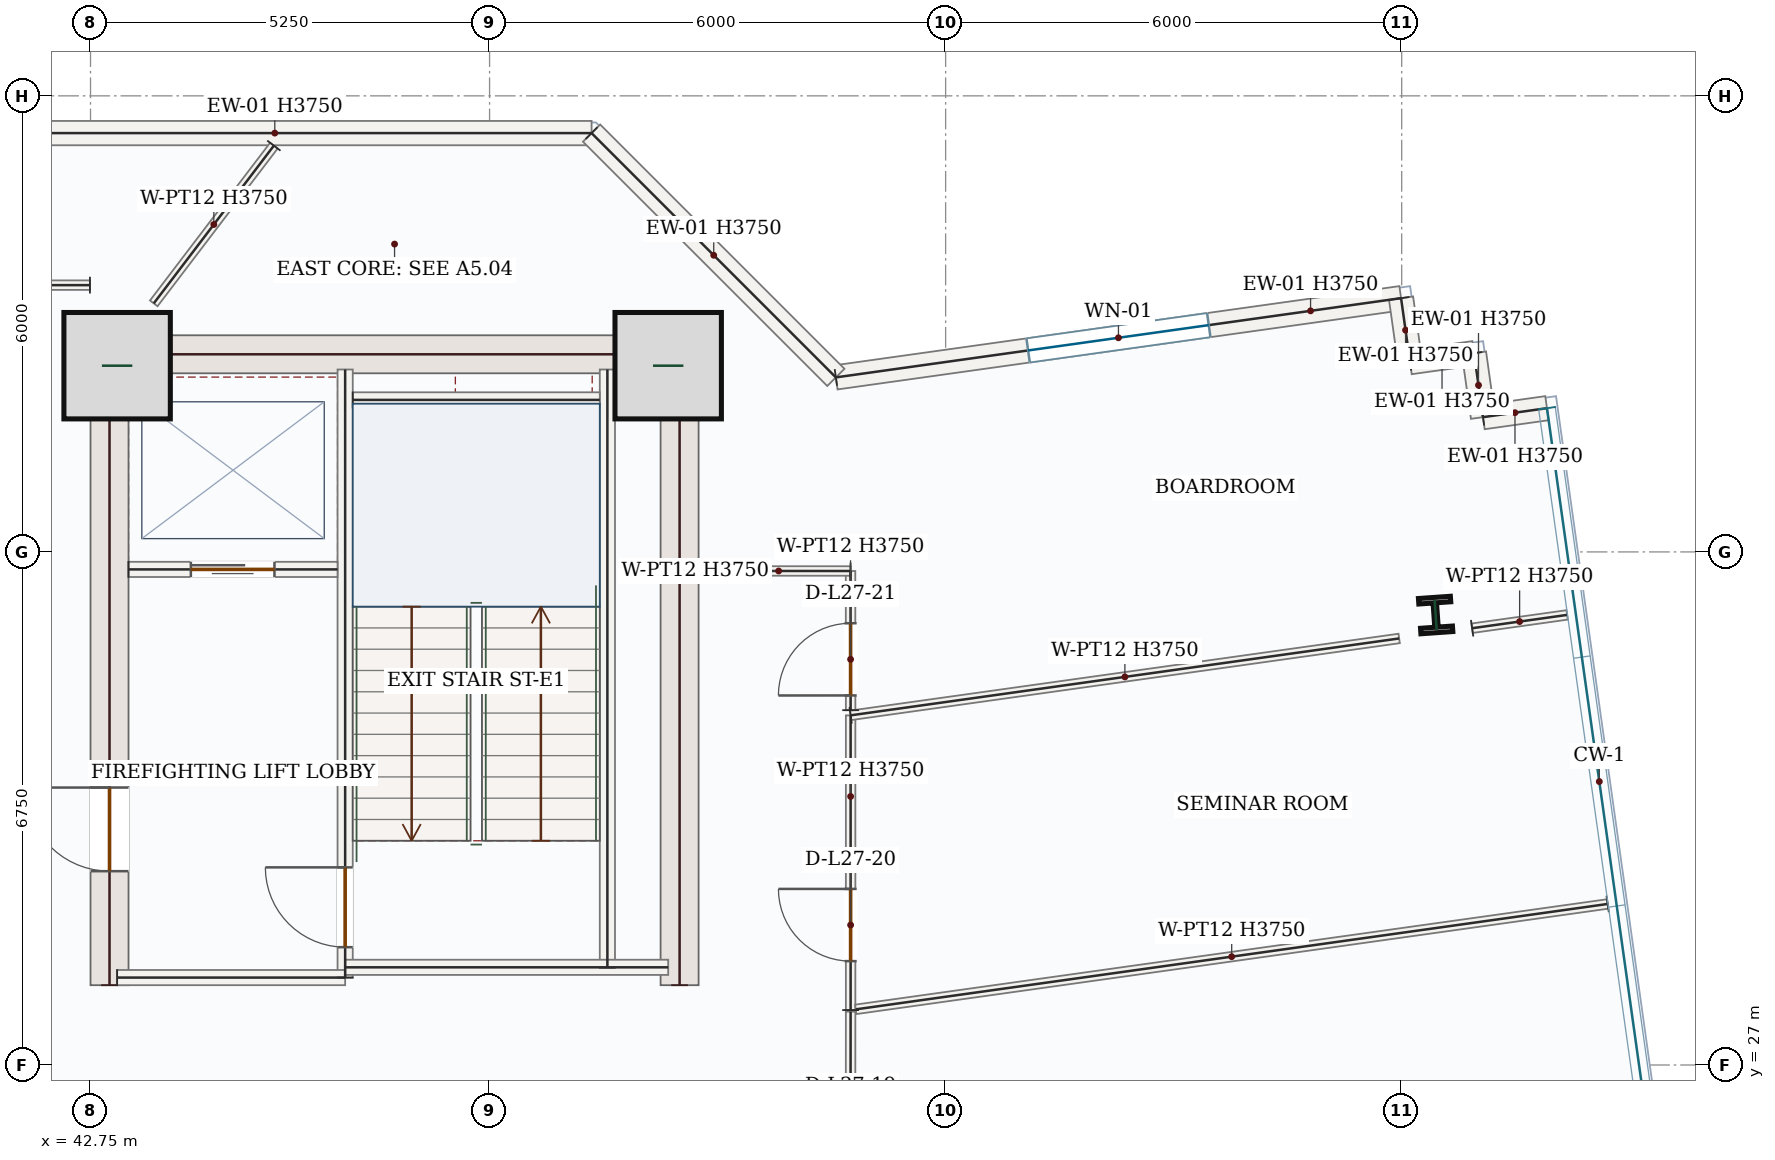
"""IFC4 building model, lengths in metres.
Left out: names, types, materials, properties, quantities, classifications, styles, units other than length and angle.
Written with IfcOpenShell. Run it as: python <this file> out.ifc"""

import sys

from ifc_helpers import new_model, si_unit, direction, frame, frame_2d, origin, origin_2d, place, context, subcontext, project, spatial, rectangle, i_section, extrude, source, transform, mapped, element, fill, save


model = new_model("IFC4")
c1 = context("Model", 3, precision=1e-05, world=origin(), true_north=direction((0.0, 1.0)))
c2 = subcontext(c1, "Body", "Model", "MODEL_VIEW")
j1 = project(units=[si_unit("LENGTHUNIT", "METRE"), si_unit("PLANEANGLEUNIT", "RADIAN")], contexts=[c1])
p1 = place(None, origin())
s1 = spatial("IfcSite", under=j1, at=p1, CompositionType="ELEMENT")
p2 = place(p1, origin())
s2 = spatial("IfcBuilding", under=s1, at=p2, CompositionType="ELEMENT")
p3 = place(p2, frame((0.0, 0.0, 121.5)))
s3 = spatial("IfcBuildingStorey", under=s2, at=p3, CompositionType="ELEMENT", Elevation=121.5)
p4 = place(p3, frame((43.0, 28.05, 0.0), z_axis=(0.0, 0.0, 1.0), x_axis=(0.0, 1.0, 0.0)))
e1 = element("IfcWall", 1, at=p4, inside=s3, PredefinedType="SHEAR", context=c2, shape_type="SweptSolid", body=[
    extrude(rectangle(XDim=8.55, YDim=0.5, at=frame_2d((4.275, 0.0))), origin(), (0.0, 0.0, 1.0), 3.75),
])
p5 = place(p4, frame((1.5, 0.0, 0.0)))
e2 = element("IfcOpeningElement", 2, at=p5, cuts=e1, PredefinedType="OPENING", context=c2, shape_type="SweptSolid", body=[
    extrude(rectangle(XDim=1.1, YDim=2.2, at=frame_2d((0.55, 1.1))), frame((0.0, 0.26, 0.0), z_axis=(0.0, -1.0, 0.0), x_axis=(1.0, 0.0, 0.0)), (0.0, 0.0, 1.0), 0.52),
])
m1 = source(origin(), c2, "Body", "SweptSolid", [
    extrude(rectangle(XDim=8.55, YDim=0.5, at=frame_2d((4.275, 0.0))), origin(), (0.0, 0.0, 1.0), 3.75),
])
p6 = place(p3, frame((50.5, 28.05, 0.0), z_axis=(0.0, 0.0, 1.0), x_axis=(0.0, 1.0, 0.0)))
e3 = element("IfcWall", 3, at=p6, inside=s3, PredefinedType="SHEAR", context=c2, shape_type="MappedRepresentation", body=[
    mapped(m1, transform((0.0, 0.0, 0.0), x_axis=(1.0, 0.0, 0.0), y_axis=(0.0, 1.0, 0.0), z_axis=(0.0, 0.0, 1.0), scale=1.0)),
])
m2 = source(origin(), c2, "Body", "SweptSolid", [
    extrude(rectangle(XDim=7.0, YDim=0.5, at=frame_2d((3.5, 0.0))), origin(), (0.0, 0.0, 1.0), 3.75),
])
p7 = place(p3, frame((43.25, 36.35, 0.0), z_axis=(0.0, 0.0, 1.0), x_axis=(1.0, 0.0, 0.0)))
e4 = element("IfcWall", 4, at=p7, inside=s3, PredefinedType="SHEAR", context=c2, shape_type="MappedRepresentation", body=[
    mapped(m2, transform((0.0, 0.0, 0.0), x_axis=(1.0, 0.0, 0.0), y_axis=(0.0, 1.0, 0.0), z_axis=(0.0, 0.0, 1.0), scale=1.0)),
])
m3 = source(origin(), c2, "Body", "SweptSolid", [
    extrude(rectangle(XDim=1.4, YDim=1.4, at=origin_2d()), origin(), (0.0, 0.0, 1.0), 4.2),
])
for number, where, z_axis, x_axis in (
    (5, (43.1, 36.2, 0.0), (0.0, 0.0, 1.0), (1.0, 0.0, 0.0)),
    (6, (50.35, 36.2, 0.0), (0.0, 0.0, 1.0), (1.0, 0.0, 0.0)),
):
    element("IfcColumn", number, at=place(p3, frame(where, z_axis=z_axis, x_axis=x_axis)), inside=s3, PredefinedType="COLUMN", context=c2, shape_type="MappedRepresentation", body=[
        mapped(m3, transform((0.0, 0.0, 0.0), x_axis=(1.0, 0.0, 0.0), y_axis=(0.0, 1.0, 0.0), z_axis=(0.0, 0.0, 1.0), scale=1.0)),
    ])
m4 = source(origin(), c2, "Body", "SweptSolid", [
    extrude(i_section(OverallWidth=0.421, OverallDepth=0.465, WebThickness=0.045, FlangeThickness=0.073, FilletRadius=0.018, at=origin_2d()), origin(), (0.0, 0.0, 1.0), 4.2),
])
p8 = place(p3, frame((60.447, 32.92, 0.0), z_axis=(0.0, 0.0, 1.0), x_axis=(0.99756405026, 0.069756473744, 0.0)))
e7 = element("IfcColumn", 7, at=p8, inside=s3, PredefinedType="COLUMN", context=c2, shape_type="MappedRepresentation", body=[
    mapped(m4, transform((0.0, 0.0, 0.0), x_axis=(1.0, 0.0, 0.0), y_axis=(0.0, 1.0, 0.0), z_axis=(0.0, 0.0, 1.0), scale=1.0)),
])
p9 = place(p3, frame((52.556, 36.046, 0.0), z_axis=(0.0, 0.0, 1.0), x_axis=(0.990319321248, 0.138807931917, 0.0)))
e8 = element("IfcWall", 8, at=p9, inside=s3, PredefinedType="SOLIDWALL", context=c2, shape_type="SweptSolid", body=[
    extrude(rectangle(XDim=7.509, YDim=0.32, at=frame_2d((3.754, 0.0))), origin(), (0.0, 0.0, 1.0), 3.75),
])
p10 = place(p9, frame((2.554, 0.0, 0.85)))
e9 = element("IfcOpeningElement", 9, at=p10, cuts=e8, PredefinedType="OPENING", context=c2, shape_type="SweptSolid", body=[
    extrude(rectangle(XDim=2.4, YDim=1.8, at=frame_2d((1.2, 0.9))), frame((0.0, 0.17, 0.0), z_axis=(0.0, -1.0, 0.0), x_axis=(1.0, 0.0, 0.0)), (0.0, 0.0, 1.0), 0.34),
])
m5 = source(origin(), c2, "Body", "SweptSolid", [
    extrude(rectangle(XDim=0.85, YDim=0.32, at=frame_2d((0.425, 0.0))), origin(), (0.0, 0.0, 1.0), 3.75),
])
for number, where, z_axis, x_axis in (
    (10, (59.992, 37.088, 0.0), (0.0, 0.0, 1.0), (0.139, -0.99, 0.0)),
    (11, (60.11, 36.247, 0.0), (0.0, 0.0, 1.0), (0.99, 0.139, 0.0)),
):
    element("IfcWall", number, at=place(p3, frame(where, z_axis=z_axis, x_axis=x_axis)), inside=s3, PredefinedType="SOLIDWALL", context=c2, shape_type="MappedRepresentation", body=[
        mapped(m5, transform((0.0, 0.0, 0.0), x_axis=(1.0, 0.0, 0.0), y_axis=(0.0, 1.0, 0.0), z_axis=(0.0, 0.0, 1.0), scale=1.0)),
    ])
m6 = source(origin(), c2, "Body", "SweptSolid", [
    extrude(rectangle(XDim=0.85, YDim=0.32, at=frame_2d((0.425, 0.0))), origin(), (0.0, 0.0, 1.0), 3.75),
])
p11 = place(p3, frame((60.952, 36.365, 0.0), z_axis=(0.0, 0.0, 1.0), x_axis=(0.138766190202, -0.990325171071, 0.0)))
e12 = element("IfcWall", 12, at=p11, inside=s3, PredefinedType="SOLIDWALL", context=c2, shape_type="MappedRepresentation", body=[
    mapped(m6, transform((0.0, 0.0, 0.0), x_axis=(1.0, 0.0, 0.0), y_axis=(0.0, 1.0, 0.0), z_axis=(0.0, 0.0, 1.0), scale=1.0)),
])
p12 = place(p3, frame((61.07, 35.523, 0.0), z_axis=(0.0, 0.0, 1.0), x_axis=(0.990330700987, 0.138726719425, 0.0)))
e13 = element("IfcWall", 13, at=p12, inside=s3, PredefinedType="SOLIDWALL", context=c2, shape_type="MappedRepresentation", body=[
    mapped(m5, transform((0.0, 0.0, 0.0), x_axis=(1.0, 0.0, 0.0), y_axis=(0.0, 1.0, 0.0), z_axis=(0.0, 0.0, 1.0), scale=1.0)),
])
m7 = source(origin(), c2, "Body", "SweptSolid", [
    extrude(rectangle(XDim=8.335, YDim=0.32, at=frame_2d((4.168, 0.0))), origin(), (0.0, 0.0, 1.0), 3.75),
])
p13 = place(p3, frame((41.007, 39.26, 0.0), z_axis=(0.0, 0.0, 1.0), x_axis=(1.0, 0.0, 0.0)))
e14 = element("IfcWall", 14, at=p13, inside=s3, PredefinedType="SOLIDWALL", context=c2, shape_type="MappedRepresentation", body=[
    mapped(m7, transform((0.0, 0.0, 0.0), x_axis=(1.0, 0.0, 0.0), y_axis=(0.0, 1.0, 0.0), z_axis=(0.0, 0.0, 1.0), scale=1.0)),
])
m8 = source(origin(), c2, "Body", "SweptSolid", [
    extrude(rectangle(XDim=4.545, YDim=0.32, at=frame_2d((2.272, 0.0))), origin(), (0.0, 0.0, 1.0), 3.75),
])
p14 = place(p3, frame((49.342, 39.26, 0.0), z_axis=(0.0, 0.0, 1.0), x_axis=(0.707106781187, -0.707106781187, 0.0)))
e15 = element("IfcWall", 15, at=p14, inside=s3, PredefinedType="SOLIDWALL", context=c2, shape_type="MappedRepresentation", body=[
    mapped(m8, transform((0.0, 0.0, 0.0), x_axis=(1.0, 0.0, 0.0), y_axis=(0.0, 1.0, 0.0), z_axis=(0.0, 0.0, 1.0), scale=1.0)),
])
m9 = source(origin(), c2, "Body", "SweptSolid", [
    extrude(rectangle(XDim=7.87, YDim=0.2, at=frame_2d((3.935, 0.0))), origin(), (0.0, 0.0, 1.0), 3.75),
])
p15 = place(p3, frame((49.55, 28.28, 0.0), z_axis=(0.0, 0.0, 1.0), x_axis=(0.0, 1.0, 0.0)))
e16 = element("IfcWall", 16, at=p15, inside=s3, PredefinedType="SOLIDWALL", context=c2, shape_type="MappedRepresentation", body=[
    mapped(m9, transform((0.0, 0.0, 0.0), x_axis=(1.0, 0.0, 0.0), y_axis=(0.0, 1.0, 0.0), z_axis=(0.0, 0.0, 1.0), scale=1.0)),
])
p16 = place(p3, frame((46.1, 28.15, 0.0), z_axis=(0.0, 0.0, 1.0), x_axis=(0.0, 1.0, 0.0)))
e17 = element("IfcWall", 17, at=p16, inside=s3, PredefinedType="SOLIDWALL", context=c2, shape_type="SweptSolid", body=[
    extrude(rectangle(XDim=8.0, YDim=0.2, at=frame_2d((4.0, 0.0))), origin(), (0.0, 0.0, 1.0), 3.75),
])
p17 = place(p16, frame((0.4, 0.0, 0.0)))
e18 = element("IfcOpeningElement", 18, at=p17, cuts=e17, PredefinedType="OPENING", context=c2, shape_type="SweptSolid", body=[
    extrude(rectangle(XDim=1.05, YDim=2.15, at=frame_2d((0.525, 1.075))), frame((0.0, 0.11, 0.0), z_axis=(0.0, -1.0, 0.0), x_axis=(1.0, 0.0, 0.0)), (0.0, 0.0, 1.0), 0.22),
])
m10 = source(origin(), c2, "Body", "SweptSolid", [
    extrude(rectangle(XDim=3.0, YDim=0.2, at=frame_2d((1.5, 0.0))), origin(), (0.0, 0.0, 1.0), 3.75),
])
p18 = place(p3, frame((43.1, 28.15, 0.0), z_axis=(0.0, 0.0, 1.0), x_axis=(1.0, 0.0, 0.0)))
e19 = element("IfcWall", 19, at=p18, inside=s3, PredefinedType="SOLIDWALL", context=c2, shape_type="MappedRepresentation", body=[
    mapped(m10, transform((0.0, 0.0, 0.0), x_axis=(1.0, 0.0, 0.0), y_axis=(0.0, 1.0, 0.0), z_axis=(0.0, 0.0, 1.0), scale=1.0)),
])
m11 = source(origin(), c2, "Body", "SweptSolid", [
    extrude(rectangle(XDim=4.25, YDim=0.2, at=frame_2d((2.125, 0.0))), origin(), (0.0, 0.0, 1.0), 3.75),
])
p19 = place(p3, frame((46.1, 28.285, 0.0), z_axis=(0.0, 0.0, 1.0), x_axis=(1.0, 0.0, 0.0)))
e20 = element("IfcWall", 20, at=p19, inside=s3, PredefinedType="SOLIDWALL", context=c2, shape_type="MappedRepresentation", body=[
    mapped(m11, transform((0.0, 0.0, 0.0), x_axis=(1.0, 0.0, 0.0), y_axis=(0.0, 1.0, 0.0), z_axis=(0.0, 0.0, 1.0), scale=1.0)),
])
m12 = source(origin(), c2, "Body", "SweptSolid", [
    extrude(rectangle(XDim=3.25, YDim=0.2, at=frame_2d((1.625, 0.0))), origin(), (0.0, 0.0, 1.0), 3.75),
])
p20 = place(p3, frame((46.2, 35.75, 0.0), z_axis=(0.0, 0.0, 1.0), x_axis=(1.0, 0.0, 0.0)))
e21 = element("IfcWall", 21, at=p20, inside=s3, PredefinedType="SOLIDWALL", context=c2, shape_type="MappedRepresentation", body=[
    mapped(m12, transform((0.0, 0.0, 0.0), x_axis=(1.0, 0.0, 0.0), y_axis=(0.0, 1.0, 0.0), z_axis=(0.0, 0.0, 1.0), scale=1.0)),
])
p21 = place(p3, frame((43.25, 33.52, 0.0), z_axis=(0.0, 0.0, 1.0), x_axis=(1.0, 0.0, 0.0)))
e22 = element("IfcWall", 22, at=p21, inside=s3, PredefinedType="SOLIDWALL", context=c2, shape_type="SweptSolid", body=[
    extrude(rectangle(XDim=2.75, YDim=0.2, at=frame_2d((1.375, 0.0))), origin(), (0.0, 0.0, 1.0), 3.75),
])
p22 = place(p21, frame((0.82, 0.0, 0.0)))
e23 = element("IfcOpeningElement", 23, at=p22, cuts=e22, PredefinedType="OPENING", context=c2, shape_type="SweptSolid", body=[
    extrude(rectangle(XDim=1.1, YDim=2.15, at=frame_2d((0.55, 1.075))), frame((0.0, 0.11, 0.0), z_axis=(0.0, -1.0, 0.0), x_axis=(1.0, 0.0, 0.0)), (0.0, 0.0, 1.0), 0.22),
])
p23 = place(p3, frame((52.75, 27.722, 0.0), z_axis=(0.0, 0.0, 1.0), x_axis=(0.0, 1.0, 0.0)))
e24 = element("IfcWall", 24, at=p23, inside=s3, PredefinedType="PARTITIONING", context=c2, shape_type="SweptSolid", body=[
    extrude(rectangle(XDim=3.877, YDim=0.125, at=frame_2d((1.939, 0.0))), origin(), (0.0, 0.0, 1.0), 3.75),
])
p24 = place(p23, frame((0.644, 0.0, 0.0)))
e25 = element("IfcOpeningElement", 25, at=p24, cuts=e24, PredefinedType="OPENING", context=c2, shape_type="SweptSolid", body=[
    extrude(rectangle(XDim=0.95, YDim=2.15, at=frame_2d((0.475, 1.075))), frame((0.0, 0.073, 0.0), z_axis=(0.0, -1.0, 0.0), x_axis=(1.0, 0.0, 0.0)), (0.0, 0.0, 1.0), 0.145),
])
m13 = source(origin(), c2, "Body", "SweptSolid", [
    extrude(rectangle(XDim=7.287, YDim=0.125, at=frame_2d((3.644, 0.0))), origin(), (0.0, 0.0, 1.0), 3.75),
])
p25 = place(p3, frame((52.75, 31.6, 0.0), z_axis=(0.0, 0.0, 1.0), x_axis=(0.990314677425, 0.138841059045, 0.0)))
e26 = element("IfcWall", 26, at=p25, inside=s3, PredefinedType="PARTITIONING", context=c2, shape_type="MappedRepresentation", body=[
    mapped(m13, transform((0.0, 0.0, 0.0), x_axis=(1.0, 0.0, 0.0), y_axis=(0.0, 1.0, 0.0), z_axis=(0.0, 0.0, 1.0), scale=1.0)),
])
m14 = source(origin(), c2, "Body", "SweptSolid", [
    extrude(rectangle(XDim=1.262, YDim=0.125, at=frame_2d((0.631, 0.0))), origin(), (0.0, 0.0, 1.0), 3.75),
])
p26 = place(p3, frame((60.927, 32.746, 0.0), z_axis=(0.0, 0.0, 1.0), x_axis=(0.990309850619, 0.138875482958, 0.0)))
e27 = element("IfcWall", 27, at=p26, inside=s3, PredefinedType="PARTITIONING", context=c2, shape_type="MappedRepresentation", body=[
    mapped(m14, transform((0.0, 0.0, 0.0), x_axis=(1.0, 0.0, 0.0), y_axis=(0.0, 1.0, 0.0), z_axis=(0.0, 0.0, 1.0), scale=1.0)),
])
m15 = source(origin(), c2, "Body", "SweptSolid", [
    extrude(rectangle(XDim=9.989, YDim=0.125, at=frame_2d((4.994, 0.0))), origin(), (0.0, 0.0, 1.0), 3.75),
])
p27 = place(p3, frame((62.709, 29.118, 0.0), z_axis=(0.0, 0.0, 1.0), x_axis=(-0.990319987422, -0.138803179046, 0.0)))
e28 = element("IfcWall", 28, at=p27, inside=s3, PredefinedType="PARTITIONING", context=c2, shape_type="MappedRepresentation", body=[
    mapped(m15, transform((0.0, 0.0, 0.0), x_axis=(1.0, 0.0, 0.0), y_axis=(0.0, 1.0, 0.0), z_axis=(0.0, 0.0, 1.0), scale=1.0)),
])
p28 = place(p3, frame((52.745, 20.569, 0.0), z_axis=(0.0, 0.0, 1.0), x_axis=(0.000684485962, 0.999999765739, 0.0)))
e29 = element("IfcWall", 29, at=p28, inside=s3, PredefinedType="PARTITIONING", context=c2, shape_type="SweptSolid", body=[
    extrude(rectangle(XDim=7.134, YDim=0.125, at=frame_2d((3.567, 0.0))), origin(), (0.0, 0.0, 1.0), 3.75),
])
p29 = place(p28, frame((4.823, 0.0, 0.0)))
e30 = element("IfcOpeningElement", 30, at=p29, cuts=e29, PredefinedType="OPENING", context=c2, shape_type="SweptSolid", body=[
    extrude(rectangle(XDim=0.95, YDim=2.15, at=frame_2d((0.475, 1.075))), frame((0.0, 0.073, 0.0), z_axis=(0.0, -1.0, 0.0), x_axis=(1.0, 0.0, 0.0)), (0.0, 0.0, 1.0), 0.145),
])
p30 = place(p3, frame((42.742, 37.26, 0.0), z_axis=(0.0, 0.0, 1.0), x_axis=(-0.999999999302, 3.7359435e-05, 0.0)))
e31 = element("IfcWall", 31, at=p30, inside=s3, PredefinedType="PARTITIONING", context=c2, shape_type="SweptSolid", body=[
    extrude(rectangle(XDim=6.535, YDim=0.125, at=frame_2d((3.268, 0.0))), origin(), (0.0, 0.0, 1.0), 3.75),
])
p31 = place(p30, frame((4.356, 0.0, 0.0)))
e32 = element("IfcOpeningElement", 32, at=p31, cuts=e31, PredefinedType="OPENING", context=c2, shape_type="SweptSolid", body=[
    extrude(rectangle(XDim=0.95, YDim=2.15, at=frame_2d((0.475, 1.075))), frame((0.0, 0.073, 0.0), z_axis=(0.0, -1.0, 0.0), x_axis=(1.0, 0.0, 0.0)), (0.0, 0.0, 1.0), 0.145),
])
m16 = source(origin(), c2, "Body", "SweptSolid", [
    extrude(rectangle(XDim=2.608, YDim=0.125, at=frame_2d((1.304, 0.0))), origin(), (0.0, 0.0, 1.0), 3.75),
])
p32 = place(p3, frame((45.162, 39.095, 0.0), z_axis=(0.0, 0.0, 1.0), x_axis=(-0.605840128894, -0.795586411537, 0.0)))
e33 = element("IfcWall", 33, at=p32, inside=s3, PredefinedType="PARTITIONING", context=c2, shape_type="MappedRepresentation", body=[
    mapped(m16, transform((0.0, 0.0, 0.0), x_axis=(1.0, 0.0, 0.0), y_axis=(0.0, 1.0, 0.0), z_axis=(0.0, 0.0, 1.0), scale=1.0)),
])
p33 = place(p3, frame((52.75, 31.668, 0.0), z_axis=(0.0, 0.0, 1.0), x_axis=(-0.000533333257, 0.999999857778, 0.0)))
e34 = element("IfcWall", 34, at=p33, inside=s3, PredefinedType="PARTITIONING", context=c2, shape_type="SweptSolid", body=[
    extrude(rectangle(XDim=1.831, YDim=0.125, at=frame_2d((0.916, 0.0))), origin(), (0.0, 0.0, 1.0), 3.75),
])
p34 = place(p33, frame((0.194, 0.0, 0.0)))
e35 = element("IfcOpeningElement", 35, at=p34, cuts=e34, PredefinedType="OPENING", context=c2, shape_type="SweptSolid", body=[
    extrude(rectangle(XDim=0.95, YDim=2.15, at=frame_2d((0.475, 1.075))), frame((0.0, 0.073, 0.0), z_axis=(0.0, -1.0, 0.0), x_axis=(1.0, 0.0, 0.0)), (0.0, 0.0, 1.0), 0.145),
])
m17 = source(origin(), c2, "Body", "SweptSolid", [
    extrude(rectangle(XDim=1.891, YDim=0.125, at=frame_2d((0.946, 0.0))), origin(), (0.0, 0.0, 1.0), 3.75),
])
p35 = place(p3, frame((52.749, 33.499, 0.0), z_axis=(0.0, 0.0, 1.0), x_axis=(-0.99999992502, 0.000387246647, 0.0)))
e36 = element("IfcWall", 36, at=p35, inside=s3, PredefinedType="PARTITIONING", context=c2, shape_type="MappedRepresentation", body=[
    mapped(m17, transform((0.0, 0.0, 0.0), x_axis=(1.0, 0.0, 0.0), y_axis=(0.0, 1.0, 0.0), z_axis=(0.0, 0.0, 1.0), scale=1.0)),
])
m18 = source(origin(), c2, "Body", "SweptSolid", [
    extrude(rectangle(XDim=2.4, YDim=1.8, at=frame_2d((1.2, 0.9))), frame((0.0, 0.03, 0.0), z_axis=(0.0, -1.0, 0.0), x_axis=(1.0, 0.0, 0.0)), (0.0, 0.0, 1.0), 0.06),
])
p36 = place(p10, origin())
e37 = element("IfcWindow", 37, at=p36, inside=s3, PartitioningType="DOUBLE_PANEL_VERTICAL", PredefinedType="WINDOW", context=c2, shape_type="MappedRepresentation", body=[
    mapped(m18, transform((0.0, 0.0, 0.0), x_axis=(1.0, 0.0, 0.0), y_axis=(0.0, 1.0, 0.0), z_axis=(0.0, 0.0, 1.0), scale=1.0)),
])
fill(e9, e37)
m19 = source(origin(), c2, "Body", "SweptSolid", [
    extrude(rectangle(XDim=1.05, YDim=2.15, at=frame_2d((0.525, 1.075))), frame((0.0, 0.025, 0.0), z_axis=(0.0, -1.0, 0.0), x_axis=(1.0, 0.0, 0.0)), (0.0, 0.0, 1.0), 0.05),
])
p37 = place(p17, origin())
e38 = element("IfcDoor", 38, at=p37, inside=s3, OperationType="SINGLE_SWING_RIGHT", PredefinedType="DOOR", context=c2, shape_type="MappedRepresentation", body=[
    mapped(m19, transform((0.0, 0.0, 0.0), x_axis=(1.0, 0.0, 0.0), y_axis=(0.0, 1.0, 0.0), z_axis=(0.0, 0.0, 1.0), scale=1.0)),
])
fill(e18, e38)
m20 = source(origin(), c2, "Body", "SweptSolid", [
    extrude(rectangle(XDim=1.1, YDim=2.15, at=frame_2d((0.55, 1.075))), frame((0.0, 0.025, 0.0), z_axis=(0.0, -1.0, 0.0), x_axis=(1.0, 0.0, 0.0)), (0.0, 0.0, 1.0), 0.05),
])
p38 = place(p22, origin())
e39 = element("IfcDoor", 39, at=p38, inside=s3, OperationType="DOUBLE_DOOR_SLIDING", PredefinedType="DOOR", context=c2, shape_type="MappedRepresentation", body=[
    mapped(m20, transform((0.0, 0.0, 0.0), x_axis=(1.0, 0.0, 0.0), y_axis=(0.0, 1.0, 0.0), z_axis=(0.0, 0.0, 1.0), scale=1.0)),
])
fill(e23, e39)
m21 = source(origin(), c2, "Body", "SweptSolid", [
    extrude(rectangle(XDim=1.1, YDim=2.2, at=frame_2d((0.55, 1.1))), frame((0.0, 0.025, 0.0), z_axis=(0.0, -1.0, 0.0), x_axis=(1.0, 0.0, 0.0)), (0.0, 0.0, 1.0), 0.05),
])
p39 = place(p5, origin())
e40 = element("IfcDoor", 40, at=p39, inside=s3, OperationType="SINGLE_SWING_RIGHT", PredefinedType="DOOR", context=c2, shape_type="MappedRepresentation", body=[
    mapped(m21, transform((0.0, 0.0, 0.0), x_axis=(1.0, 0.0, 0.0), y_axis=(0.0, 1.0, 0.0), z_axis=(0.0, 0.0, 1.0), scale=1.0)),
])
fill(e2, e40)
m22 = source(origin(), c2, "Body", "SweptSolid", [
    extrude(rectangle(XDim=0.95, YDim=2.15, at=frame_2d((0.475, 1.075))), frame((0.0, 0.025, 0.0), z_axis=(0.0, -1.0, 0.0), x_axis=(1.0, 0.0, 0.0)), (0.0, 0.0, 1.0), 0.05),
])
p40 = place(p24, origin())
e41 = element("IfcDoor", 41, at=p40, inside=s3, OperationType="SINGLE_SWING_RIGHT", PredefinedType="DOOR", context=c2, shape_type="MappedRepresentation", body=[
    mapped(m22, transform((0.0, 0.0, 0.0), x_axis=(1.0, 0.0, 0.0), y_axis=(0.0, 1.0, 0.0), z_axis=(0.0, 0.0, 1.0), scale=1.0)),
])
fill(e25, e41)
p41 = place(p34, origin())
e42 = element("IfcDoor", 42, at=p41, inside=s3, OperationType="SINGLE_SWING_LEFT", PredefinedType="DOOR", context=c2, shape_type="MappedRepresentation", body=[
    mapped(m22, transform((0.0, 0.0, 0.0), x_axis=(1.0, 0.0, 0.0), y_axis=(0.0, 1.0, 0.0), z_axis=(0.0, 0.0, 1.0), scale=1.0)),
])
fill(e35, e42)
save(model, sys.argv[1])
